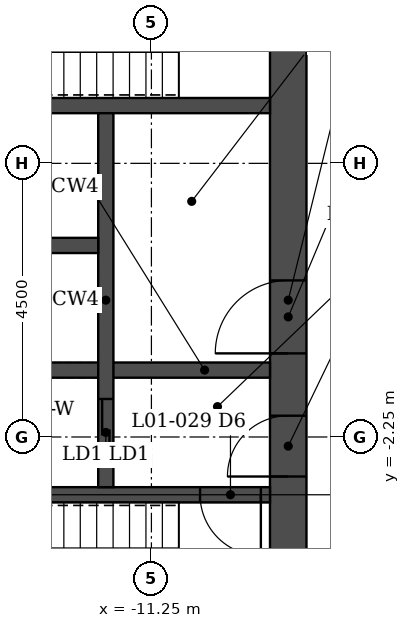
"""IFC4 building model, lengths in metres.
Left out: names, types, materials, properties, quantities, classifications, styles, units other than length and angle.
Written with IfcOpenShell. Run it as: python <this file> out.ifc"""

import sys

from ifc_helpers import new_model, si_unit, direction, frame, frame_2d, origin, place, context, subcontext, project, spatial, rectangle, extrude, element, fill, save


model = new_model("IFC4")
c1 = context("Model", 3, precision=1e-05, world=origin(), true_north=direction((0.0, 1.0)))
c2 = subcontext(c1, "Body", "Model", "MODEL_VIEW")
j1 = project(units=[si_unit("LENGTHUNIT", "METRE"), si_unit("PLANEANGLEUNIT", "RADIAN")], contexts=[c1])
p1 = place(None, origin())
s1 = spatial("IfcSite", under=j1, at=p1, CompositionType="ELEMENT")
p2 = place(p1, origin())
s2 = spatial("IfcBuilding", under=s1, at=p2, CompositionType="ELEMENT")
p3 = place(p2, frame((0.0, 0.0, 6.0)))
s3 = spatial("IfcBuildingStorey", under=s2, at=p3, CompositionType="ELEMENT", Elevation=6.0)
p4 = place(p3, frame((-9.0, -6.45, 0.0), z_axis=(0.0, 0.0, 1.0), x_axis=(0.0, 1.0, 0.0)))
e1 = element("IfcWall", 1, at=p4, inside=s3, PredefinedType="SHEAR", context=c2, shape_type="SweptSolid", body=[
    extrude(rectangle(XDim=12.9, YDim=0.6, at=frame_2d((6.45, 0.0))), origin(), (0.0, 0.0, 1.0), 5.0),
])
p5 = place(p4, frame((3.55, 0.0, 0.0)))
e2 = element("IfcOpeningElement", 2, at=p5, cuts=e1, PredefinedType="OPENING", context=c2, shape_type="SweptSolid", body=[
    extrude(rectangle(XDim=1.0, YDim=2.1, at=frame_2d((0.5, 1.05))), frame((0.0, 0.31, 0.0), z_axis=(0.0, -1.0, 0.0), x_axis=(1.0, 0.0, 0.0)), (0.0, 0.0, 1.0), 0.62),
])
p6 = place(p4, frame((5.575, 0.0, 0.0)))
e3 = element("IfcOpeningElement", 3, at=p6, cuts=e1, PredefinedType="OPENING", context=c2, shape_type="SweptSolid", body=[
    extrude(rectangle(XDim=1.2, YDim=2.1, at=frame_2d((0.6, 1.05))), frame((0.0, 0.31, 0.0), z_axis=(0.0, -1.0, 0.0), x_axis=(1.0, 0.0, 0.0)), (0.0, 0.0, 1.0), 0.62),
])
p7 = place(p4, frame((10.85, 0.0, 0.0)))
e4 = element("IfcOpeningElement", 4, at=p7, cuts=e1, PredefinedType="OPENING", context=c2, shape_type="SweptSolid", body=[
    extrude(rectangle(XDim=1.0, YDim=2.1, at=frame_2d((0.5, 1.05))), frame((0.0, 0.31, 0.0), z_axis=(0.0, -1.0, 0.0), x_axis=(1.0, 0.0, 0.0)), (0.0, 0.0, 1.0), 0.62),
])
p8 = place(p3, frame((-9.3, -3.2, 0.0), z_axis=(0.0, 0.0, 1.0), x_axis=(-1.0, 0.0, 0.0)))
e5 = element("IfcWall", 5, at=p8, inside=s3, PredefinedType="SHEAR", context=c2, shape_type="SweptSolid", body=[
    extrude(rectangle(XDim=8.4, YDim=0.25, at=frame_2d((4.2, 0.0))), origin(), (0.0, 0.0, 1.0), 5.0),
])
p9 = place(p8, frame((0.15, 0.0, 0.0)))
e6 = element("IfcOpeningElement", 6, at=p9, cuts=e5, PredefinedType="OPENING", context=c2, shape_type="SweptSolid", body=[
    extrude(rectangle(XDim=1.0, YDim=2.1, at=frame_2d((0.5, 1.05))), frame((0.0, 0.135, 0.0), z_axis=(0.0, -1.0, 0.0), x_axis=(1.0, 0.0, 0.0)), (0.0, 0.0, 1.0), 0.27),
])
p10 = place(p3, frame((-9.3, 3.2, 0.0), z_axis=(0.0, 0.0, 1.0), x_axis=(-1.0, 0.0, 0.0)))
e7 = element("IfcWall", 7, at=p10, inside=s3, PredefinedType="SHEAR", context=c2, shape_type="SweptSolid", body=[
    extrude(rectangle(XDim=8.4, YDim=0.25, at=frame_2d((4.2, 0.0))), origin(), (0.0, 0.0, 1.0), 5.0),
])
p11 = place(p3, frame((-9.3, -1.15, 0.0), z_axis=(0.0, 0.0, 1.0), x_axis=(-1.0, 0.0, 0.0)))
e8 = element("IfcWall", 8, at=p11, inside=s3, PredefinedType="SHEAR", context=c2, shape_type="SweptSolid", body=[
    extrude(rectangle(XDim=5.375, YDim=0.25, at=frame_2d((2.688, 0.0))), origin(), (0.0, 0.0, 1.0), 5.0),
])
p12 = place(p3, frame((-12.0, -3.075, 0.0), z_axis=(0.0, 0.0, 1.0), x_axis=(0.0, 1.0, 0.0)))
e9 = element("IfcWall", 9, at=p12, inside=s3, PredefinedType="SHEAR", context=c2, shape_type="SweptSolid", body=[
    extrude(rectangle(XDim=6.15, YDim=0.25, at=frame_2d((3.075, 0.0))), origin(), (0.0, 0.0, 1.0), 5.0),
])
p13 = place(p12, frame((0.35, 0.0, 0.0)))
e10 = element("IfcOpeningElement", 10, at=p13, cuts=e9, PredefinedType="OPENING", context=c2, shape_type="SweptSolid", body=[
    extrude(rectangle(XDim=1.1, YDim=2.1, at=frame_2d((0.55, 1.05))), frame((0.0, 0.135, 0.0), z_axis=(0.0, -1.0, 0.0), x_axis=(1.0, 0.0, 0.0)), (0.0, 0.0, 1.0), 0.27),
])
p14 = place(p3, frame((-12.125, 0.9, 0.0), z_axis=(0.0, 0.0, 1.0), x_axis=(-1.0, 0.0, 0.0)))
e11 = element("IfcWall", 11, at=p14, inside=s3, PredefinedType="SHEAR", context=c2, shape_type="SweptSolid", body=[
    extrude(rectangle(XDim=2.55, YDim=0.25, at=frame_2d((1.275, 0.0))), origin(), (0.0, 0.0, 1.0), 5.0),
])
p15 = place(p5, origin())
e12 = element("IfcDoor", 12, at=p15, inside=s3, OperationType="SINGLE_SWING_LEFT", PredefinedType="DOOR", context=c2, shape_type="SweptSolid", body=[
    extrude(rectangle(XDim=1.0, YDim=2.1, at=frame_2d((0.5, 1.05))), frame((0.0, 0.025, 0.0), z_axis=(0.0, -1.0, 0.0), x_axis=(1.0, 0.0, 0.0)), (0.0, 0.0, 1.0), 0.05),
])
fill(e2, e12)
p16 = place(p9, origin())
e13 = element("IfcDoor", 13, at=p16, inside=s3, OperationType="SINGLE_SWING_LEFT", PredefinedType="DOOR", context=c2, shape_type="SweptSolid", body=[
    extrude(rectangle(XDim=1.0, YDim=2.1, at=frame_2d((0.5, 1.05))), frame((0.0, 0.025, 0.0), z_axis=(0.0, -1.0, 0.0), x_axis=(1.0, 0.0, 0.0)), (0.0, 0.0, 1.0), 0.05),
])
fill(e6, e13)
p17 = place(p6, origin())
e14 = element("IfcDoor", 14, at=p17, inside=s3, OperationType="SINGLE_SWING_LEFT", PredefinedType="DOOR", context=c2, shape_type="SweptSolid", body=[
    extrude(rectangle(XDim=1.2, YDim=2.1, at=frame_2d((0.6, 1.05))), frame((0.0, 0.025, 0.0), z_axis=(0.0, -1.0, 0.0), x_axis=(1.0, 0.0, 0.0)), (0.0, 0.0, 1.0), 0.05),
])
fill(e3, e14)
p18 = place(p13, origin())
e15 = element("IfcDoor", 15, at=p18, inside=s3, OperationType="DOUBLE_DOOR_SLIDING", PredefinedType="DOOR", context=c2, shape_type="SweptSolid", body=[
    extrude(rectangle(XDim=1.1, YDim=2.1, at=frame_2d((0.55, 1.05))), frame((0.0, 0.025, 0.0), z_axis=(0.0, -1.0, 0.0), x_axis=(1.0, 0.0, 0.0)), (0.0, 0.0, 1.0), 0.05),
])
fill(e10, e15)
save(model, sys.argv[1])
